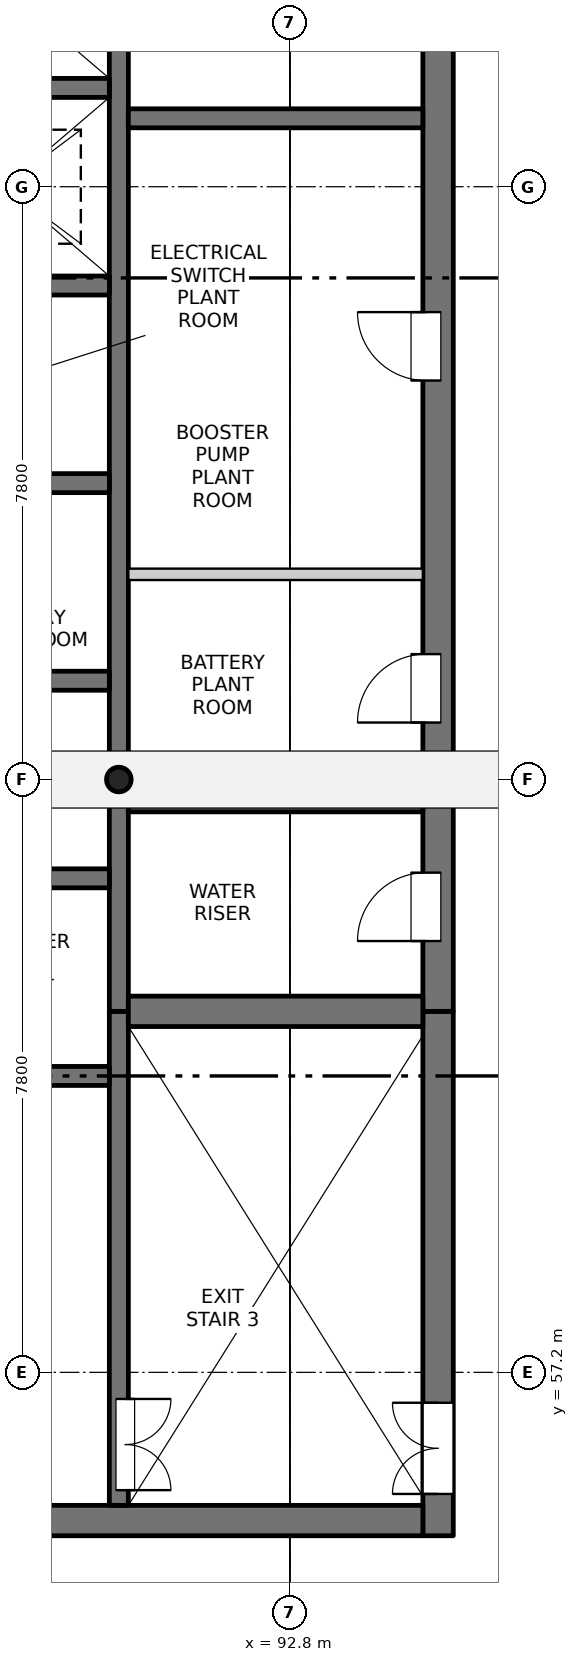
"""IFC4 building model, lengths in metres.
Left out: names, types, materials, properties, quantities, classifications, styles, units other than length and angle.
Written with IfcOpenShell. Run it as: python <this file> out.ifc"""

import sys

from ifc_helpers import new_model, si_unit, direction, frame, frame_2d, origin, origin_2d, place, context, subcontext, project, spatial, rectangle, hollow_circle, extrude, element, fill, save


model = new_model("IFC4")
c1 = context("Model", 3, precision=1e-05, world=origin(), true_north=direction((0.0, 1.0)))
c2 = subcontext(c1, "Body", "Model", "MODEL_VIEW")
j1 = project(units=[si_unit("LENGTHUNIT", "METRE"), si_unit("PLANEANGLEUNIT", "RADIAN")], contexts=[c1])
p1 = place(None, origin())
s1 = spatial("IfcSite", under=j1, at=p1, CompositionType="ELEMENT")
p2 = place(p1, origin())
s2 = spatial("IfcBuilding", under=s1, at=p2, CompositionType="ELEMENT")
p3 = place(p2, frame((0.0, 0.0, 266.4)))
s3 = spatial("IfcBuildingStorey", under=s2, at=p3, CompositionType="ELEMENT", Elevation=266.4)
p4 = place(p3, frame((94.75, 55.05, -0.3), z_axis=(0.0, 0.0, 1.0), x_axis=(0.0, 1.0, 0.0)))
e1 = element("IfcWall", 1, at=p4, inside=s3, PredefinedType="SOLIDWALL", context=c2, shape_type="SweptSolid", body=[
    extrude(rectangle(XDim=6.9, YDim=0.4, at=frame_2d((3.45, 0.0))), origin(), (0.0, 0.0, 1.0), 6.0),
])
p5 = place(p4, frame((0.55, 0.0, 0.3)))
e2 = element("IfcOpeningElement", 2, at=p5, cuts=e1, PredefinedType="OPENING", context=c2, shape_type="SweptSolid", body=[
    extrude(rectangle(XDim=1.2, YDim=2.1, at=frame_2d((0.6, 1.05))), frame((0.0, 0.21, 0.0), z_axis=(0.0, -1.0, 0.0), x_axis=(1.0, 0.0, 0.0)), (0.0, 0.0, 1.0), 0.42),
])
p6 = place(p3, frame((94.75, 61.95, -0.3), z_axis=(0.0, 0.0, 1.0), x_axis=(0.0, 1.0, 0.0)))
e3 = element("IfcWall", 3, at=p6, inside=s3, PredefinedType="SOLIDWALL", context=c2, shape_type="SweptSolid", body=[
    extrude(rectangle(XDim=15.35, YDim=0.4, at=frame_2d((7.675, 0.0))), origin(), (0.0, 0.0, 1.0), 6.0),
])
p7 = place(p6, frame((0.925, 0.0, 0.3)))
e4 = element("IfcOpeningElement", 4, at=p7, cuts=e3, PredefinedType="OPENING", context=c2, shape_type="SweptSolid", body=[
    extrude(rectangle(XDim=0.9, YDim=2.1, at=frame_2d((0.45, 1.05))), frame((0.0, 0.21, 0.0), z_axis=(0.0, -1.0, 0.0), x_axis=(1.0, 0.0, 0.0)), (0.0, 0.0, 1.0), 0.42),
])
p8 = place(p6, frame((3.8, 0.0, 0.3)))
e5 = element("IfcOpeningElement", 5, at=p8, cuts=e3, PredefinedType="OPENING", context=c2, shape_type="SweptSolid", body=[
    extrude(rectangle(XDim=0.9, YDim=2.1, at=frame_2d((0.45, 1.05))), frame((0.0, 0.21, 0.0), z_axis=(0.0, -1.0, 0.0), x_axis=(1.0, 0.0, 0.0)), (0.0, 0.0, 1.0), 0.42),
])
p9 = place(p6, frame((8.3, 0.0, 0.3)))
e6 = element("IfcOpeningElement", 6, at=p9, cuts=e3, PredefinedType="OPENING", context=c2, shape_type="SweptSolid", body=[
    extrude(rectangle(XDim=0.9, YDim=2.1, at=frame_2d((0.45, 1.05))), frame((0.0, 0.21, 0.0), z_axis=(0.0, -1.0, 0.0), x_axis=(1.0, 0.0, 0.0)), (0.0, 0.0, 1.0), 0.42),
])
p10 = place(p6, frame((13.1, 0.0, 0.3)))
e7 = element("IfcOpeningElement", 7, at=p10, cuts=e3, PredefinedType="OPENING", context=c2, shape_type="SweptSolid", body=[
    extrude(rectangle(XDim=0.9, YDim=2.1, at=frame_2d((0.45, 1.05))), frame((0.0, 0.21, 0.0), z_axis=(0.0, -1.0, 0.0), x_axis=(1.0, 0.0, 0.0)), (0.0, 0.0, 1.0), 0.42),
])
p11 = place(p3, frame((75.45, 55.25, -0.3), z_axis=(0.0, 0.0, 1.0), x_axis=(1.0, 0.0, 0.0)))
e8 = element("IfcWall", 8, at=p11, inside=s3, PredefinedType="SOLIDWALL", context=c2, shape_type="SweptSolid", body=[
    extrude(rectangle(XDim=19.1, YDim=0.4, at=frame_2d((9.55, 0.0))), origin(), (0.0, 0.0, 1.0), 6.0),
])
p12 = place(p11, frame((8.8, 0.0, 0.3)))
e9 = element("IfcOpeningElement", 9, at=p12, cuts=e8, PredefinedType="OPENING", context=c2, shape_type="SweptSolid", body=[
    extrude(rectangle(XDim=1.5, YDim=2.1, at=frame_2d((0.75, 1.05))), frame((0.0, 0.21, 0.0), z_axis=(0.0, -1.0, 0.0), x_axis=(1.0, 0.0, 0.0)), (0.0, 0.0, 1.0), 0.42),
])
p13 = place(p3, frame((90.55, 55.45, -0.3), z_axis=(0.0, 0.0, 1.0), x_axis=(0.0, 1.0, 0.0)))
e10 = element("IfcWall", 10, at=p13, inside=s3, PredefinedType="SOLIDWALL", context=c2, shape_type="SweptSolid", body=[
    extrude(rectangle(XDim=6.5, YDim=0.25, at=frame_2d((3.25, 0.0))), origin(), (0.0, 0.0, 1.0), 6.0),
])
p14 = place(p13, frame((0.2, 0.0, 0.3)))
e11 = element("IfcOpeningElement", 11, at=p14, cuts=e10, PredefinedType="OPENING", context=c2, shape_type="SweptSolid", body=[
    extrude(rectangle(XDim=1.2, YDim=2.1, at=frame_2d((0.6, 1.05))), frame((0.0, 0.135, 0.0), z_axis=(0.0, -1.0, 0.0), x_axis=(1.0, 0.0, 0.0)), (0.0, 0.0, 1.0), 0.27),
])
p15 = place(p3, frame((90.55, 61.95, -0.3), z_axis=(0.0, 0.0, 1.0), x_axis=(0.0, 1.0, 0.0)))
e12 = element("IfcWall", 12, at=p15, inside=s3, PredefinedType="SOLIDWALL", context=c2, shape_type="SweptSolid", body=[
    extrude(rectangle(XDim=15.35, YDim=0.25, at=frame_2d((7.675, 0.0))), origin(), (0.0, 0.0, 1.0), 6.0),
])
for number, where, z_axis, x_axis in (
    (13, (87.425, 61.1, -0.3), (0.0, 0.0, 1.0), (1.0, 0.0, 0.0)),
    (14, (87.425, 63.7, -0.3), (0.0, 0.0, 1.0), (1.0, 0.0, 0.0)),
    (15, (87.425, 66.3, -0.3), (0.0, 0.0, 1.0), (1.0, 0.0, 0.0)),
    (16, (87.425, 68.9, -0.3), (0.0, 0.0, 1.0), (1.0, 0.0, 0.0)),
    (17, (87.425, 71.5, -0.3), (0.0, 0.0, 1.0), (1.0, 0.0, 0.0)),
    (18, (87.425, 74.1, -0.3), (0.0, 0.0, 1.0), (1.0, 0.0, 0.0)),
):
    element("IfcWall", number, at=place(p3, frame(where, z_axis=z_axis, x_axis=x_axis)), inside=s3, PredefinedType="SOLIDWALL", context=c2, shape_type="SweptSolid", body=[
        extrude(rectangle(XDim=3.0, YDim=0.25, at=frame_2d((1.5, 0.0))), origin(), (0.0, 0.0, 1.0), 6.0),
    ])
p16 = place(p3, frame((90.675, 61.95, -0.3), z_axis=(0.0, 0.0, 1.0), x_axis=(1.0, 0.0, 0.0)))
e19 = element("IfcWall", 19, at=p16, inside=s3, PredefinedType="SOLIDWALL", context=c2, shape_type="SweptSolid", body=[
    extrude(rectangle(XDim=3.875, YDim=0.4, at=frame_2d((1.938, 0.0))), origin(), (0.0, 0.0, 1.0), 6.0),
])
for number, where, z_axis, x_axis in (
    (20, (90.675, 64.7, -0.3), (0.0, 0.0, 1.0), (1.0, 0.0, 0.0)),
    (21, (90.675, 73.7, -0.3), (0.0, 0.0, 1.0), (1.0, 0.0, 0.0)),
):
    element("IfcWall", number, at=place(p3, frame(where, z_axis=z_axis, x_axis=x_axis)), inside=s3, PredefinedType="SOLIDWALL", context=c2, shape_type="SweptSolid", body=[
        extrude(rectangle(XDim=3.875, YDim=0.25, at=frame_2d((1.938, 0.0))), origin(), (0.0, 0.0, 1.0), 6.0),
    ])
p17 = place(p3, frame((90.55, 65.0, 6.996), z_axis=(0.0, 0.0, 1.0), x_axis=(1.0, 0.0, 0.0)))
e22 = element("IfcColumn", 22, at=p17, inside=s3, PredefinedType="COLUMN", context=c2, shape_type="SweptSolid", body=[
    extrude(hollow_circle(Radius=0.163, WallThickness=0.012, at=origin_2d()), origin(), (0.0, 0.0, 1.0), 8.212),
])
p18 = place(p3, frame((90.675, 67.7, 0.0), z_axis=(0.0, 0.0, 1.0), x_axis=(1.0, 0.0, 0.0)))
e23 = element("IfcWall", 23, at=p18, inside=s3, PredefinedType="PARTITIONING", context=c2, shape_type="SweptSolid", body=[
    extrude(rectangle(XDim=3.875, YDim=0.15, at=frame_2d((1.938, 0.0))), origin(), (0.0, 0.0, 1.0), 5.7),
])
p19 = place(p5, origin())
e24 = element("IfcDoor", 24, at=p19, inside=s3, OperationType="DOUBLE_DOOR_SINGLE_SWING", PredefinedType="DOOR", context=c2, shape_type="SweptSolid", body=[
    extrude(rectangle(XDim=1.2, YDim=2.1, at=frame_2d((0.6, 1.05))), frame((0.0, 0.025, 0.0), z_axis=(0.0, -1.0, 0.0), x_axis=(1.0, 0.0, 0.0)), (0.0, 0.0, 1.0), 0.05),
])
fill(e2, e24)
p20 = place(p14, origin())
e25 = element("IfcDoor", 25, at=p20, inside=s3, OperationType="DOUBLE_DOOR_SINGLE_SWING", PredefinedType="DOOR", context=c2, shape_type="SweptSolid", body=[
    extrude(rectangle(XDim=1.2, YDim=2.1, at=frame_2d((0.6, 1.05))), frame((0.0, -0.06, 0.0), z_axis=(0.0, -1.0, 0.0), x_axis=(1.0, 0.0, 0.0)), (0.0, 0.0, 1.0), 0.05),
])
fill(e11, e25)
p21 = place(p7, origin())
e26 = element("IfcDoor", 26, at=p21, inside=s3, OperationType="SINGLE_SWING_LEFT", PredefinedType="DOOR", context=c2, shape_type="SweptSolid", body=[
    extrude(rectangle(XDim=0.9, YDim=2.1, at=frame_2d((0.45, 1.05))), frame((0.0, 0.185, 0.0), z_axis=(0.0, -1.0, 0.0), x_axis=(1.0, 0.0, 0.0)), (0.0, 0.0, 1.0), 0.05),
])
fill(e4, e26)
p22 = place(p8, origin())
e27 = element("IfcDoor", 27, at=p22, inside=s3, OperationType="SINGLE_SWING_LEFT", PredefinedType="DOOR", context=c2, shape_type="SweptSolid", body=[
    extrude(rectangle(XDim=0.9, YDim=2.1, at=frame_2d((0.45, 1.05))), frame((0.0, 0.185, 0.0), z_axis=(0.0, -1.0, 0.0), x_axis=(1.0, 0.0, 0.0)), (0.0, 0.0, 1.0), 0.05),
])
fill(e5, e27)
p23 = place(p9, origin())
e28 = element("IfcDoor", 28, at=p23, inside=s3, OperationType="SINGLE_SWING_RIGHT", PredefinedType="DOOR", context=c2, shape_type="SweptSolid", body=[
    extrude(rectangle(XDim=0.9, YDim=2.1, at=frame_2d((0.45, 1.05))), frame((0.0, 0.185, 0.0), z_axis=(0.0, -1.0, 0.0), x_axis=(1.0, 0.0, 0.0)), (0.0, 0.0, 1.0), 0.05),
])
fill(e6, e28)
save(model, sys.argv[1])
